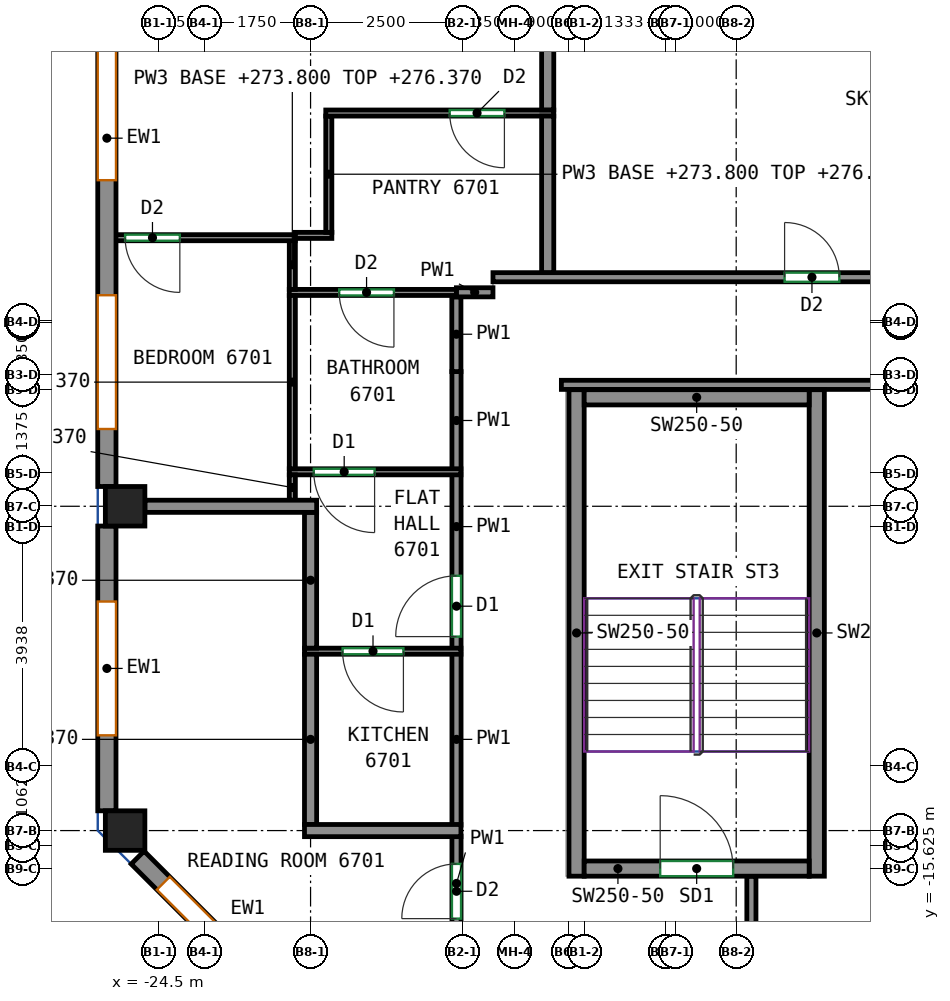
"""IFC4 building model, lengths in metres.
Left out: names, types, materials, properties, quantities, classifications, styles, units other than length and angle.
Written with IfcOpenShell. Run it as: python <this file> out.ifc"""

import sys

from ifc_helpers import new_model, si_unit, direction, frame, frame_2d, origin, origin_2d, place, context, subcontext, project, spatial, rectangle, extrude, source, transform, mapped, element, fill, save


model = new_model("IFC4")
c1 = context("Model", 3, precision=1e-05, world=origin(), true_north=direction((0.0, 1.0)))
c2 = subcontext(c1, "Body", "Model", "MODEL_VIEW")
j1 = project(units=[si_unit("LENGTHUNIT", "METRE"), si_unit("PLANEANGLEUNIT", "RADIAN")], contexts=[c1])
p1 = place(None, origin())
s1 = spatial("IfcSite", under=j1, at=p1, CompositionType="ELEMENT")
p2 = place(p1, origin())
s2 = spatial("IfcBuilding", under=s1, at=p2, CompositionType="ELEMENT")
p3 = place(p2, frame((0.0, 0.0, 273.8)))
s3 = spatial("IfcBuildingStorey", under=s2, at=p3, CompositionType="ELEMENT", Elevation=273.8)
m1 = source(origin(), c2, "Body", "SweptSolid", [
    extrude(rectangle(XDim=0.65, YDim=0.65, at=origin_2d()), origin(), (0.0, 0.0, 1.0), 3.12),
])
for number, where, z_axis, x_axis in (
    (1, (-25.05, -15.0, 0.0), (0.0, 0.0, 1.0), (1.0, 0.0, 0.0)),
    (2, (-25.05, -9.667, 0.0), (0.0, 0.0, 1.0), (1.0, 0.0, 0.0)),
):
    element("IfcColumn", number, at=place(p3, frame(where, z_axis=z_axis, x_axis=x_axis)), inside=s3, PredefinedType="COLUMN", context=c2, shape_type="MappedRepresentation", body=[
        mapped(m1, transform((0.0, 0.0, 0.0))),
    ])
m2 = source(origin(), c2, "Body", "SweptSolid", [
    extrude(rectangle(XDim=8.0, YDim=0.25, at=frame_2d((4.0, 0.0))), origin(), (0.0, 0.0, 1.0), 3.12),
])
for number, where, z_axis, x_axis in (
    (3, (-17.625, -15.75, 0.0), (0.0, 0.0, 1.0), (0.0, 1.0, 0.0)),
    (4, (-13.675, -15.75, 0.0), (0.0, 0.0, 1.0), (0.0, 1.0, 0.0)),
):
    element("IfcWall", number, at=place(p3, frame(where, z_axis=z_axis, x_axis=x_axis)), inside=s3, PredefinedType="SHEAR", context=c2, shape_type="MappedRepresentation", body=[
        mapped(m2, transform((0.0, 0.0, 0.0))),
    ])
m3 = source(origin(), c2, "Body", "SweptSolid", [
    extrude(rectangle(XDim=3.7, YDim=0.25, at=frame_2d((1.85, 0.0))), origin(), (0.0, 0.0, 1.0), 3.12),
])
p4 = place(p3, frame((-17.5, -15.625, 0.0), z_axis=(0.0, 0.0, 1.0), x_axis=(1.0, 0.0, 0.0)))
e5 = element("IfcWall", 5, at=p4, inside=s3, PredefinedType="SHEAR", context=c2, shape_type="MappedRepresentation", body=[
    mapped(m3, transform((0.0, 0.0, 0.0))),
])
p5 = place(p4, frame((1.25, 0.0, 0.0)))
e6 = element("IfcOpeningElement", 6, at=p5, cuts=e5, PredefinedType="OPENING", context=c2, shape_type="SweptSolid", body=[
    extrude(rectangle(XDim=1.2, YDim=2.1, at=frame_2d((0.6, 1.05))), frame((0.0, 0.135, 0.0), z_axis=(0.0, -1.0, 0.0), x_axis=(1.0, 0.0, 0.0)), (0.0, 0.0, 1.0), 0.27),
])
p6 = place(p3, frame((-17.5, -7.875, 0.0), z_axis=(0.0, 0.0, 1.0), x_axis=(1.0, 0.0, 0.0)))
e7 = element("IfcWall", 7, at=p6, inside=s3, PredefinedType="SHEAR", context=c2, shape_type="MappedRepresentation", body=[
    mapped(m3, transform((0.0, 0.0, 0.0))),
])
m4 = source(origin(), c2, "Body", "SweptSolid", [
    extrude(rectangle(XDim=8.184, YDim=0.3, at=frame_2d((4.092, 0.0))), origin(), (0.0, 0.0, 1.0), 3.12),
])
p7 = place(p3, frame((-25.35, -1.158, 0.0), z_axis=(0.0, 0.0, 1.0), x_axis=(0.0, -1.0, 0.0)))
e8 = element("IfcWall", 8, at=p7, inside=s3, PredefinedType="SOLIDWALL", context=c2, shape_type="MappedRepresentation", body=[
    mapped(m4, transform((0.0, 0.0, 0.0))),
])
p8 = place(p7, frame((0.946, 0.0, 0.8)))
e9 = element("IfcOpeningElement", 9, at=p8, cuts=e8, PredefinedType="OPENING", context=c2, shape_type="SweptSolid", body=[
    extrude(rectangle(XDim=2.2, YDim=2.05, at=frame_2d((1.1, 1.025))), frame((0.0, 0.16, 0.0), z_axis=(0.0, -1.0, 0.0), x_axis=(1.0, 0.0, 0.0)), (0.0, 0.0, 1.0), 0.32),
])
p9 = place(p7, frame((5.038, 0.0, 0.8)))
e10 = element("IfcOpeningElement", 10, at=p9, cuts=e8, PredefinedType="OPENING", context=c2, shape_type="SweptSolid", body=[
    extrude(rectangle(XDim=2.2, YDim=2.05, at=frame_2d((1.1, 1.025))), frame((0.0, 0.16, 0.0), z_axis=(0.0, -1.0, 0.0), x_axis=(1.0, 0.0, 0.0)), (0.0, 0.0, 1.0), 0.32),
])
m5 = source(origin(), c2, "Body", "SweptSolid", [
    extrude(rectangle(XDim=4.683, YDim=0.3, at=frame_2d((2.342, 0.0))), origin(), (0.0, 0.0, 1.0), 3.12),
])
p10 = place(p3, frame((-25.35, -9.992, 0.0), z_axis=(0.0, 0.0, 1.0), x_axis=(0.0, -1.0, 0.0)))
e11 = element("IfcWall", 11, at=p10, inside=s3, PredefinedType="SOLIDWALL", context=c2, shape_type="MappedRepresentation", body=[
    mapped(m5, transform((0.0, 0.0, 0.0))),
])
p11 = place(p10, frame((1.242, 0.0, 0.8)))
e12 = element("IfcOpeningElement", 12, at=p11, cuts=e11, PredefinedType="OPENING", context=c2, shape_type="SweptSolid", body=[
    extrude(rectangle(XDim=2.2, YDim=2.05, at=frame_2d((1.1, 1.025))), frame((0.0, 0.16, 0.0), z_axis=(0.0, -1.0, 0.0), x_axis=(1.0, 0.0, 0.0)), (0.0, 0.0, 1.0), 0.32),
])
m6 = source(origin(), c2, "Body", "SweptSolid", [
    extrude(rectangle(XDim=3.394, YDim=0.3, at=frame_2d((1.697, 0.0))), origin(), (0.0, 0.0, 1.0), 3.12),
])
p12 = place(p3, frame((-24.844, -15.444, 0.0), z_axis=(0.0, 0.0, 1.0), x_axis=(0.707070815327, -0.707142745217, 0.0)))
e13 = element("IfcWall", 13, at=p12, inside=s3, PredefinedType="SOLIDWALL", context=c2, shape_type="MappedRepresentation", body=[
    mapped(m6, transform((0.0, 0.0, 0.0))),
])
p13 = place(p12, frame((0.597, 0.0, 0.8)))
e14 = element("IfcOpeningElement", 14, at=p13, cuts=e13, PredefinedType="OPENING", context=c2, shape_type="SweptSolid", body=[
    extrude(rectangle(XDim=2.2, YDim=2.05, at=frame_2d((1.1, 1.025))), frame((0.0, 0.16, 0.0), z_axis=(0.0, -1.0, 0.0), x_axis=(1.0, 0.0, 0.0)), (0.0, 0.0, 1.0), 0.32),
])
p14 = place(p3, frame((-19.6, -14.91, 0.0), z_axis=(0.0, 0.0, 1.0), x_axis=(0.0, 1.0, 0.0)))
e15 = element("IfcWall", 15, at=p14, inside=s3, PredefinedType="PARTITIONING", context=c2, shape_type="SweptSolid", body=[
    extrude(rectangle(XDim=2.82, YDim=0.15, at=frame_2d((1.41, 0.0))), origin(), (0.0, 0.0, 1.0), 3.12),
])
p15 = place(p3, frame((-19.6, -12.01, 0.0), z_axis=(0.0, 0.0, 1.0), x_axis=(0.0, 1.0, 0.0)))
e16 = element("IfcWall", 16, at=p15, inside=s3, PredefinedType="PARTITIONING", context=c2, shape_type="SweptSolid", body=[
    extrude(rectangle(XDim=2.87, YDim=0.15, at=frame_2d((1.435, 0.0))), origin(), (0.0, 0.0, 1.0), 3.12),
])
p16 = place(p15, frame((0.2, 0.0, 0.0)))
e17 = element("IfcOpeningElement", 17, at=p16, cuts=e16, PredefinedType="OPENING", context=c2, shape_type="SweptSolid", body=[
    extrude(rectangle(XDim=1.0, YDim=2.1, at=frame_2d((0.5, 1.05))), frame((0.0, 0.085, 0.0), z_axis=(0.0, -1.0, 0.0), x_axis=(1.0, 0.0, 0.0)), (0.0, 0.0, 1.0), 0.17),
])
p17 = place(p3, frame((-19.6, -9.06, 0.0), z_axis=(0.0, 0.0, 1.0), x_axis=(0.0, 1.0, 0.0)))
e18 = element("IfcWall", 18, at=p17, inside=s3, PredefinedType="PARTITIONING", context=c2, shape_type="SweptSolid", body=[
    extrude(rectangle(XDim=1.608, YDim=0.15, at=frame_2d((0.804, 0.0))), origin(), (0.0, 0.0, 1.0), 3.12),
])
p18 = place(p3, frame((-19.602, -7.452, 0.0), z_axis=(0.0, 0.0, 1.0), x_axis=(0.0, 1.0, 0.0)))
e19 = element("IfcWall", 19, at=p18, inside=s3, PredefinedType="PARTITIONING", context=c2, shape_type="SweptSolid", body=[
    extrude(rectangle(XDim=1.229, YDim=0.15, at=frame_2d((0.615, 0.0))), origin(), (0.0, 0.0, 1.0), 3.12),
])
p19 = place(p3, frame((-19.0, -6.148, 0.0), z_axis=(0.0, 0.0, 1.0), x_axis=(-1.0, 0.0, 0.0)))
e20 = element("IfcWall", 20, at=p19, inside=s3, PredefinedType="PARTITIONING", context=c2, shape_type="SweptSolid", body=[
    extrude(rectangle(XDim=0.602, YDim=0.15, at=frame_2d((0.301, 0.0))), origin(), (0.0, 0.0, 1.0), 3.12),
])
p20 = place(p3, frame((-19.0, -5.9, 0.0), z_axis=(0.0, 0.0, 1.0), x_axis=(1.0, 0.0, 0.0)))
e21 = element("IfcWall", 21, at=p20, inside=s3, PredefinedType="PARTITIONING", context=c2, shape_type="SweptSolid", body=[
    extrude(rectangle(XDim=25.655, YDim=0.15, at=frame_2d((12.828, 0.0))), origin(), (0.0, 0.0, 1.0), 3.12),
])
p21 = place(p20, frame((4.796, 0.0, 0.0)))
e22 = element("IfcOpeningElement", 22, at=p21, cuts=e21, PredefinedType="OPENING", context=c2, shape_type="SweptSolid", body=[
    extrude(rectangle(XDim=0.9, YDim=2.1, at=frame_2d((0.45, 1.05))), frame((0.0, 0.085, 0.0), z_axis=(0.0, -1.0, 0.0), x_axis=(1.0, 0.0, 0.0)), (0.0, 0.0, 1.0), 0.17),
])
p22 = place(p20, frame((21.535, 0.0, 0.0)))
e23 = element("IfcOpeningElement", 23, at=p22, cuts=e21, PredefinedType="OPENING", context=c2, shape_type="SweptSolid", body=[
    extrude(rectangle(XDim=0.9, YDim=2.1, at=frame_2d((0.45, 1.05))), frame((0.0, 0.085, 0.0), z_axis=(0.0, -1.0, 0.0), x_axis=(1.0, 0.0, 0.0)), (0.0, 0.0, 1.0), 0.17),
])
p23 = place(p3, frame((-17.875, -7.67, 0.0), z_axis=(0.0, 0.0, 1.0), x_axis=(1.0, 0.0, 0.0)))
e24 = element("IfcWall", 24, at=p23, inside=s3, PredefinedType="PARTITIONING", context=c2, shape_type="SweptSolid", body=[
    extrude(rectangle(XDim=13.385, YDim=0.15, at=frame_2d((6.692, 0.0))), origin(), (0.0, 0.0, 1.0), 3.12),
])
p24 = place(p23, frame((10.774, 0.0, 0.0)))
e25 = element("IfcOpeningElement", 25, at=p24, cuts=e24, PredefinedType="OPENING", context=c2, shape_type="SweptSolid", body=[
    extrude(rectangle(XDim=0.9, YDim=2.1, at=frame_2d((0.45, 1.05))), frame((0.0, 0.085, 0.0), z_axis=(0.0, -1.0, 0.0), x_axis=(1.0, 0.0, 0.0)), (0.0, 0.0, 1.0), 0.17),
])
p25 = place(p3, frame((-14.75, -17.55, 0.0), z_axis=(0.0, 0.0, 1.0), x_axis=(0.0, 1.0, 0.0)))
e26 = element("IfcWall", 26, at=p25, inside=s3, PredefinedType="PARTITIONING", context=c2, shape_type="SweptSolid", body=[
    extrude(rectangle(XDim=1.8, YDim=0.15, at=frame_2d((0.9, 0.0))), origin(), (0.0, 0.0, 1.0), 3.12),
])
p26 = place(p3, frame((-19.6, -16.648, 0.0), z_axis=(0.0, 0.0, 1.0), x_axis=(0.0, 1.0, 0.0)))
e27 = element("IfcWall", 27, at=p26, inside=s3, PredefinedType="PARTITIONING", context=c2, shape_type="SweptSolid", body=[
    extrude(rectangle(XDim=1.558, YDim=0.15, at=frame_2d((0.779, 0.0))), origin(), (0.0, 0.0, 1.0), 3.12),
])
p27 = place(p26, frame((0.2, 0.0, 0.0)))
e28 = element("IfcOpeningElement", 28, at=p27, cuts=e27, PredefinedType="OPENING", context=c2, shape_type="SweptSolid", body=[
    extrude(rectangle(XDim=0.9, YDim=2.1, at=frame_2d((0.45, 1.05))), frame((0.0, 0.085, 0.0), z_axis=(0.0, -1.0, 0.0), x_axis=(1.0, 0.0, 0.0)), (0.0, 0.0, 1.0), 0.17),
])
p28 = place(p3, frame((-19.527, -12.05, 0.0), z_axis=(0.0, 0.0, 1.0), x_axis=(-1.0, 0.0, 0.0)))
e29 = element("IfcWall", 29, at=p28, inside=s3, PredefinedType="PARTITIONING", context=c2, shape_type="SweptSolid", body=[
    extrude(rectangle(XDim=2.573, YDim=0.1, at=frame_2d((1.287, 0.0))), origin(), (0.0, 0.0, 1.0), 3.12),
])
p29 = place(p28, frame((0.946, 0.0, 0.0)))
e30 = element("IfcOpeningElement", 30, at=p29, cuts=e29, PredefinedType="OPENING", context=c2, shape_type="SweptSolid", body=[
    extrude(rectangle(XDim=1.0, YDim=2.1, at=frame_2d((0.5, 1.05))), frame((0.0, 0.06, 0.0), z_axis=(0.0, -1.0, 0.0), x_axis=(1.0, 0.0, 0.0)), (0.0, 0.0, 1.0), 0.12),
])
p30 = place(p3, frame((-22.0, -14.9, 0.0), z_axis=(0.0, 0.0, 1.0), x_axis=(0.0, 1.0, 0.0)))
e31 = element("IfcWall", 31, at=p30, inside=s3, PredefinedType="PARTITIONING", context=c2, shape_type="SweptSolid", body=[
    extrude(rectangle(XDim=2.8, YDim=0.2, at=frame_2d((1.4, 0.0))), origin(), (0.0, 0.0, 1.0), 2.57),
])
p31 = place(p3, frame((-22.1, -15.0, 0.0), z_axis=(0.0, 0.0, 1.0), x_axis=(1.0, 0.0, 0.0)))
e32 = element("IfcWall", 32, at=p31, inside=s3, PredefinedType="PARTITIONING", context=c2, shape_type="SweptSolid", body=[
    extrude(rectangle(XDim=2.573, YDim=0.2, at=frame_2d((1.287, 0.0))), origin(), (0.0, 0.0, 1.0), 3.12),
])
p32 = place(p3, frame((-19.527, -9.1, 0.0), z_axis=(0.0, 0.0, 1.0), x_axis=(-1.0, 0.0, 0.0)))
e33 = element("IfcWall", 33, at=p32, inside=s3, PredefinedType="PARTITIONING", context=c2, shape_type="SweptSolid", body=[
    extrude(rectangle(XDim=2.823, YDim=0.1, at=frame_2d((1.412, 0.0))), origin(), (0.0, 0.0, 1.0), 3.12),
])
p33 = place(p32, frame((1.42, 0.0, 0.0)))
e34 = element("IfcOpeningElement", 34, at=p33, cuts=e33, PredefinedType="OPENING", context=c2, shape_type="SweptSolid", body=[
    extrude(rectangle(XDim=1.0, YDim=2.1, at=frame_2d((0.5, 1.05))), frame((0.0, 0.06, 0.0), z_axis=(0.0, -1.0, 0.0), x_axis=(1.0, 0.0, 0.0)), (0.0, 0.0, 1.0), 0.12),
])
p34 = place(p3, frame((-22.3, -9.567, 0.0), z_axis=(0.0, 0.0, 1.0), x_axis=(0.0, 1.0, 0.0)))
e35 = element("IfcWall", 35, at=p34, inside=s3, PredefinedType="PARTITIONING", context=c2, shape_type="SweptSolid", body=[
    extrude(rectangle(XDim=0.417, YDim=0.1, at=frame_2d((0.208, 0.0))), origin(), (0.0, 0.0, 1.0), 2.57),
])
p35 = place(p3, frame((-22.0, -12.0, 0.0), z_axis=(0.0, 0.0, 1.0), x_axis=(0.0, 1.0, 0.0)))
e36 = element("IfcWall", 36, at=p35, inside=s3, PredefinedType="PARTITIONING", context=c2, shape_type="SweptSolid", body=[
    extrude(rectangle(XDim=2.233, YDim=0.2, at=frame_2d((1.116, 0.0))), origin(), (0.0, 0.0, 1.0), 2.57),
])
p36 = place(p3, frame((-19.602, -6.15, 0.0), z_axis=(0.0, 0.0, 1.0), x_axis=(-1.0, 0.0, 0.0)))
e37 = element("IfcWall", 37, at=p36, inside=s3, PredefinedType="PARTITIONING", context=c2, shape_type="SweptSolid", body=[
    extrude(rectangle(XDim=2.748, YDim=0.1, at=frame_2d((1.374, 0.0))), origin(), (0.0, 0.0, 1.0), 3.12),
])
p37 = place(p36, frame((1.027, 0.0, 0.0)))
e38 = element("IfcOpeningElement", 38, at=p37, cuts=e37, PredefinedType="OPENING", context=c2, shape_type="SweptSolid", body=[
    extrude(rectangle(XDim=0.9, YDim=2.1, at=frame_2d((0.45, 1.05))), frame((0.0, 0.06, 0.0), z_axis=(0.0, -1.0, 0.0), x_axis=(1.0, 0.0, 0.0)), (0.0, 0.0, 1.0), 0.12),
])
p38 = place(p3, frame((-22.3, -9.05, 0.0), z_axis=(0.0, 0.0, 1.0), x_axis=(0.0, 1.0, 0.0)))
e39 = element("IfcWall", 39, at=p38, inside=s3, PredefinedType="PARTITIONING", context=c2, shape_type="SweptSolid", body=[
    extrude(rectangle(XDim=2.85, YDim=0.1, at=frame_2d((1.425, 0.0))), origin(), (0.0, 0.0, 1.0), 2.57),
])
p39 = place(p3, frame((-22.3, -6.1, 0.0), z_axis=(0.0, 0.0, 1.0), x_axis=(0.0, 1.0, 0.0)))
e40 = element("IfcWall", 40, at=p39, inside=s3, PredefinedType="PARTITIONING", context=c2, shape_type="SweptSolid", body=[
    extrude(rectangle(XDim=0.81, YDim=0.1, at=frame_2d((0.405, 0.0))), origin(), (0.0, 0.0, 1.0), 2.57),
])
p40 = place(p3, frame((-21.65, -5.212, 0.0), z_axis=(0.0, 0.0, 1.0), x_axis=(-1.0, 0.0, 0.0)))
e41 = element("IfcWall", 41, at=p40, inside=s3, PredefinedType="PARTITIONING", context=c2, shape_type="SweptSolid", body=[
    extrude(rectangle(XDim=0.602, YDim=0.1, at=frame_2d((0.301, 0.0))), origin(), (0.0, 0.0, 1.0), 3.12),
])
p41 = place(p3, frame((-21.7, -5.162, 0.0), z_axis=(0.0, 0.0, 1.0), x_axis=(0.0, 1.0, 0.0)))
e42 = element("IfcWall", 42, at=p41, inside=s3, PredefinedType="PARTITIONING", context=c2, shape_type="SweptSolid", body=[
    extrude(rectangle(XDim=1.912, YDim=0.1, at=frame_2d((0.956, 0.0))), origin(), (0.0, 0.0, 1.0), 2.57),
])
p42 = place(p3, frame((-18.0, -3.2, 0.0), z_axis=(0.0, 0.0, 1.0), x_axis=(-1.0, 0.0, 0.0)))
e43 = element("IfcWall", 43, at=p42, inside=s3, PredefinedType="PARTITIONING", context=c2, shape_type="SweptSolid", body=[
    extrude(rectangle(XDim=3.75, YDim=0.1, at=frame_2d((1.875, 0.0))), origin(), (0.0, 0.0, 1.0), 3.12),
])
p43 = place(p42, frame((0.812, 0.0, 0.0)))
e44 = element("IfcOpeningElement", 44, at=p43, cuts=e43, PredefinedType="OPENING", context=c2, shape_type="SweptSolid", body=[
    extrude(rectangle(XDim=0.9, YDim=2.1, at=frame_2d((0.45, 1.05))), frame((0.0, 0.06, 0.0), z_axis=(0.0, -1.0, 0.0), x_axis=(1.0, 0.0, 0.0)), (0.0, 0.0, 1.0), 0.12),
])
p44 = place(p3, frame((-18.1, -5.823, 0.0), z_axis=(0.0, 0.0, 1.0), x_axis=(0.0, 1.0, 0.0)))
e45 = element("IfcWall", 45, at=p44, inside=s3, PredefinedType="PARTITIONING", context=c2, shape_type="SweptSolid", body=[
    extrude(rectangle(XDim=2.573, YDim=0.2, at=frame_2d((1.287, 0.0))), origin(), (0.0, 0.0, 1.0), 3.12),
])
p45 = place(p3, frame((-22.252, -5.25, 0.0), z_axis=(0.0, 0.0, 1.0), x_axis=(-1.0, 0.0, 0.0)))
e46 = element("IfcWall", 46, at=p45, inside=s3, PredefinedType="PARTITIONING", context=c2, shape_type="SweptSolid", body=[
    extrude(rectangle(XDim=2.998, YDim=0.1, at=frame_2d((1.499, 0.0))), origin(), (0.0, 0.0, 1.0), 3.12),
])
p46 = place(p45, frame((1.898, 0.0, 0.0)))
e47 = element("IfcOpeningElement", 47, at=p46, cuts=e46, PredefinedType="OPENING", context=c2, shape_type="SweptSolid", body=[
    extrude(rectangle(XDim=0.9, YDim=2.1, at=frame_2d((0.45, 1.05))), frame((0.0, 0.06, 0.0), z_axis=(0.0, -1.0, 0.0), x_axis=(1.0, 0.0, 0.0)), (0.0, 0.0, 1.0), 0.12),
])
p47 = place(p3, frame((-24.725, -9.667, 0.0), z_axis=(0.0, 0.0, 1.0), x_axis=(1.0, 0.0, 0.0)))
e48 = element("IfcWall", 48, at=p47, inside=s3, PredefinedType="PARTITIONING", context=c2, shape_type="SweptSolid", body=[
    extrude(rectangle(XDim=2.825, YDim=0.2, at=frame_2d((1.413, 0.0))), origin(), (0.0, 0.0, 1.0), 3.12),
])
p48 = place(p3, frame((-18.1, -3.148, 0.0), z_axis=(0.0, 0.0, 1.0), x_axis=(0.0, 1.0, 0.0)))
e49 = element("IfcWall", 49, at=p48, inside=s3, PredefinedType="PARTITIONING", context=c2, shape_type="SweptSolid", body=[
    extrude(rectangle(XDim=6.681, YDim=0.2, at=frame_2d((3.34, 0.0))), origin(), (0.0, 0.0, 1.0), 3.12),
])
p49 = place(p8, origin())
e50 = element("IfcWindow", 50, at=p49, inside=s3, PartitioningType="SINGLE_PANEL", PredefinedType="WINDOW", context=c2, shape_type="SweptSolid", body=[
    extrude(rectangle(XDim=2.2, YDim=2.05, at=frame_2d((1.1, 1.025))), frame((0.0, 0.03, 0.0), z_axis=(0.0, -1.0, 0.0), x_axis=(1.0, 0.0, 0.0)), (0.0, 0.0, 1.0), 0.06),
])
fill(e9, e50)
p50 = place(p9, origin())
e51 = element("IfcWindow", 51, at=p50, inside=s3, PartitioningType="SINGLE_PANEL", PredefinedType="WINDOW", context=c2, shape_type="SweptSolid", body=[
    extrude(rectangle(XDim=2.2, YDim=2.05, at=frame_2d((1.1, 1.025))), frame((0.0, 0.03, 0.0), z_axis=(0.0, -1.0, 0.0), x_axis=(1.0, 0.0, 0.0)), (0.0, 0.0, 1.0), 0.06),
])
fill(e10, e51)
p51 = place(p11, origin())
e52 = element("IfcWindow", 52, at=p51, inside=s3, PartitioningType="SINGLE_PANEL", PredefinedType="WINDOW", context=c2, shape_type="SweptSolid", body=[
    extrude(rectangle(XDim=2.2, YDim=2.05, at=frame_2d((1.1, 1.025))), frame((0.0, 0.03, 0.0), z_axis=(0.0, -1.0, 0.0), x_axis=(1.0, 0.0, 0.0)), (0.0, 0.0, 1.0), 0.06),
])
fill(e12, e52)
p52 = place(p13, origin())
e53 = element("IfcWindow", 53, at=p52, inside=s3, PartitioningType="SINGLE_PANEL", PredefinedType="WINDOW", context=c2, shape_type="SweptSolid", body=[
    extrude(rectangle(XDim=2.2, YDim=2.05, at=frame_2d((1.1, 1.025))), frame((0.0, 0.03, 0.0), z_axis=(0.0, -1.0, 0.0), x_axis=(1.0, 0.0, 0.0)), (0.0, 0.0, 1.0), 0.06),
])
fill(e14, e53)
p53 = place(p5, origin())
e54 = element("IfcDoor", 54, at=p53, inside=s3, OperationType="DOUBLE_DOOR_SINGLE_SWING", PredefinedType="DOOR", context=c2, shape_type="SweptSolid", body=[
    extrude(rectangle(XDim=1.2, YDim=2.1, at=frame_2d((0.6, 1.05))), frame((0.0, 0.025, 0.0), z_axis=(0.0, -1.0, 0.0), x_axis=(1.0, 0.0, 0.0)), (0.0, 0.0, 1.0), 0.05),
])
fill(e6, e54)
p54 = place(p27, origin())
e55 = element("IfcDoor", 55, at=p54, inside=s3, OperationType="SINGLE_SWING_LEFT", PredefinedType="DOOR", context=c2, shape_type="SweptSolid", body=[
    extrude(rectangle(XDim=0.9, YDim=2.1, at=frame_2d((0.45, 1.05))), frame((0.0, 0.025, 0.0), z_axis=(0.0, -1.0, 0.0), x_axis=(1.0, 0.0, 0.0)), (0.0, 0.0, 1.0), 0.05),
])
fill(e28, e55)
p55 = place(p29, origin())
e56 = element("IfcDoor", 56, at=p55, inside=s3, OperationType="SINGLE_SWING_LEFT", PredefinedType="DOOR", context=c2, shape_type="SweptSolid", body=[
    extrude(rectangle(XDim=1.0, YDim=2.1, at=frame_2d((0.5, 1.05))), frame((0.0, 0.025, 0.0), z_axis=(0.0, -1.0, 0.0), x_axis=(1.0, 0.0, 0.0)), (0.0, 0.0, 1.0), 0.05),
])
fill(e30, e56)
p56 = place(p16, origin())
e57 = element("IfcDoor", 57, at=p56, inside=s3, OperationType="SINGLE_SWING_LEFT", PredefinedType="DOOR", context=c2, shape_type="SweptSolid", body=[
    extrude(rectangle(XDim=1.0, YDim=2.1, at=frame_2d((0.5, 1.05))), frame((0.0, 0.025, 0.0), z_axis=(0.0, -1.0, 0.0), x_axis=(1.0, 0.0, 0.0)), (0.0, 0.0, 1.0), 0.05),
])
fill(e17, e57)
p57 = place(p33, origin())
e58 = element("IfcDoor", 58, at=p57, inside=s3, OperationType="SINGLE_SWING_LEFT", PredefinedType="DOOR", context=c2, shape_type="SweptSolid", body=[
    extrude(rectangle(XDim=1.0, YDim=2.1, at=frame_2d((0.5, 1.05))), frame((0.0, 0.025, 0.0), z_axis=(0.0, -1.0, 0.0), x_axis=(1.0, 0.0, 0.0)), (0.0, 0.0, 1.0), 0.05),
])
fill(e34, e58)
p58 = place(p37, origin())
e59 = element("IfcDoor", 59, at=p58, inside=s3, OperationType="SINGLE_SWING_LEFT", PredefinedType="DOOR", context=c2, shape_type="SweptSolid", body=[
    extrude(rectangle(XDim=0.9, YDim=2.1, at=frame_2d((0.45, 1.05))), frame((0.0, 0.025, 0.0), z_axis=(0.0, -1.0, 0.0), x_axis=(1.0, 0.0, 0.0)), (0.0, 0.0, 1.0), 0.05),
])
fill(e38, e59)
p59 = place(p21, origin())
e60 = element("IfcDoor", 60, at=p59, inside=s3, OperationType="SINGLE_SWING_LEFT", PredefinedType="DOOR", context=c2, shape_type="SweptSolid", body=[
    extrude(rectangle(XDim=0.9, YDim=2.1, at=frame_2d((0.45, 1.05))), frame((0.0, 0.025, 0.0), z_axis=(0.0, -1.0, 0.0), x_axis=(1.0, 0.0, 0.0)), (0.0, 0.0, 1.0), 0.05),
])
fill(e22, e60)
p60 = place(p46, origin())
e61 = element("IfcDoor", 61, at=p60, inside=s3, OperationType="SINGLE_SWING_LEFT", PredefinedType="DOOR", context=c2, shape_type="SweptSolid", body=[
    extrude(rectangle(XDim=0.9, YDim=2.1, at=frame_2d((0.45, 1.05))), frame((0.0, 0.025, 0.0), z_axis=(0.0, -1.0, 0.0), x_axis=(1.0, 0.0, 0.0)), (0.0, 0.0, 1.0), 0.05),
])
fill(e47, e61)
p61 = place(p43, origin())
e62 = element("IfcDoor", 62, at=p61, inside=s3, OperationType="SINGLE_SWING_LEFT", PredefinedType="DOOR", context=c2, shape_type="SweptSolid", body=[
    extrude(rectangle(XDim=0.9, YDim=2.1, at=frame_2d((0.45, 1.05))), frame((0.0, 0.025, 0.0), z_axis=(0.0, -1.0, 0.0), x_axis=(1.0, 0.0, 0.0)), (0.0, 0.0, 1.0), 0.05),
])
fill(e44, e62)
save(model, sys.argv[1])
